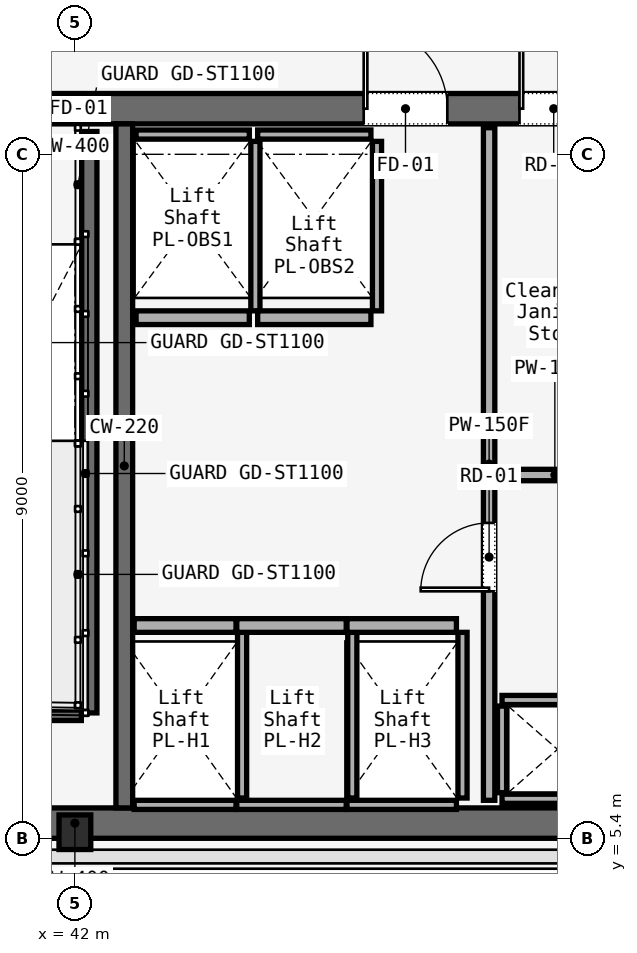
"""IFC4 building model, lengths in metres.
Left out: names, types, materials, properties, quantities, classifications, styles, units other than length and angle.
Written with IfcOpenShell. Run it as: python <this file> out.ifc"""

import sys

from ifc_helpers import new_model, si_unit, direction, frame, frame_2d, origin, origin_2d, place, context, subcontext, project, spatial, rectangle, i_section, extrude, element, fill, save


model = new_model("IFC4")
c1 = context("Model", 3, precision=1e-05, world=origin(), true_north=direction((0.0, 1.0)))
c2 = subcontext(c1, "Body", "Model", "MODEL_VIEW")
j1 = project(units=[si_unit("LENGTHUNIT", "METRE"), si_unit("PLANEANGLEUNIT", "RADIAN")], contexts=[c1])
p1 = place(None, origin())
s1 = spatial("IfcSite", under=j1, at=p1, CompositionType="ELEMENT")
p2 = place(p1, origin())
s2 = spatial("IfcBuilding", under=s1, at=p2, CompositionType="ELEMENT")
p3 = place(p2, frame((0.0, 0.0, 191.6)))
s3 = spatial("IfcBuildingStorey", under=s2, at=p3, CompositionType="ELEMENT", Elevation=191.6)
p4 = place(p3, frame((26.45, 15.0, 0.0), z_axis=(0.0, 0.0, 1.0), x_axis=(1.0, 0.0, 0.0)))
e1 = element("IfcWall", 1, at=p4, inside=s3, PredefinedType="SOLIDWALL", context=c2, shape_type="SweptSolid", body=[
    extrude(rectangle(XDim=31.1, YDim=0.4, at=frame_2d((15.55, 0.0))), origin(), (0.0, 0.0, 1.0), 3.58),
])
p5 = place(p4, frame((1.65, 0.0, 0.0)))
e2 = element("IfcOpeningElement", 2, at=p5, cuts=e1, PredefinedType="OPENING", context=c2, shape_type="SweptSolid", body=[
    extrude(rectangle(XDim=1.1, YDim=2.2, at=frame_2d((0.55, 1.1))), frame((0.0, 0.2, 0.0), z_axis=(0.0, -1.0, 0.0), x_axis=(1.0, 0.0, 0.0)), (0.0, 0.0, 1.0), 0.4),
])
p6 = place(p4, frame((13.65, 0.0, 0.0)))
e3 = element("IfcOpeningElement", 3, at=p6, cuts=e1, PredefinedType="OPENING", context=c2, shape_type="SweptSolid", body=[
    extrude(rectangle(XDim=1.1, YDim=2.2, at=frame_2d((0.55, 1.1))), frame((0.0, 0.2, 0.0), z_axis=(0.0, -1.0, 0.0), x_axis=(1.0, 0.0, 0.0)), (0.0, 0.0, 1.0), 0.4),
])
p7 = place(p4, frame((25.55, 0.0, 0.0)))
e4 = element("IfcOpeningElement", 4, at=p7, cuts=e1, PredefinedType="OPENING", context=c2, shape_type="SweptSolid", body=[
    extrude(rectangle(XDim=1.1, YDim=2.2, at=frame_2d((0.55, 1.1))), frame((0.0, 0.2, 0.0), z_axis=(0.0, -1.0, 0.0), x_axis=(1.0, 0.0, 0.0)), (0.0, 0.0, 1.0), 0.4),
])
p8 = place(p4, frame((10.7, 0.0, 0.0)))
e5 = element("IfcOpeningElement", 5, at=p8, cuts=e1, PredefinedType="OPENING", context=c2, shape_type="SweptSolid", body=[
    extrude(rectangle(XDim=1.4, YDim=2.2, at=frame_2d((0.7, 1.1))), frame((0.0, 0.2, 0.0), z_axis=(0.0, -1.0, 0.0), x_axis=(1.0, 0.0, 0.0)), (0.0, 0.0, 1.0), 0.4),
])
p9 = place(p4, frame((19.35, 0.0, 0.0)))
e6 = element("IfcOpeningElement", 6, at=p9, cuts=e1, PredefinedType="OPENING", context=c2, shape_type="SweptSolid", body=[
    extrude(rectangle(XDim=1.1, YDim=2.2, at=frame_2d((0.55, 1.1))), frame((0.0, 0.2, 0.0), z_axis=(0.0, -1.0, 0.0), x_axis=(1.0, 0.0, 0.0)), (0.0, 0.0, 1.0), 0.4),
])
p10 = place(p4, frame((21.4, 0.0, 0.0)))
e7 = element("IfcOpeningElement", 7, at=p10, cuts=e1, PredefinedType="OPENING", context=c2, shape_type="SweptSolid", body=[
    extrude(rectangle(XDim=0.9, YDim=2.1, at=frame_2d((0.45, 1.05))), frame((0.0, 0.2, 0.0), z_axis=(0.0, -1.0, 0.0), x_axis=(1.0, 0.0, 0.0)), (0.0, 0.0, 1.0), 0.4),
])
p11 = place(p4, frame((23.35, 0.0, 0.0)))
e8 = element("IfcOpeningElement", 8, at=p11, cuts=e1, PredefinedType="OPENING", context=c2, shape_type="SweptSolid", body=[
    extrude(rectangle(XDim=1.3, YDim=2.3, at=frame_2d((0.65, 1.15))), frame((0.0, 0.2, 0.0), z_axis=(0.0, -1.0, 0.0), x_axis=(1.0, 0.0, 0.0)), (0.0, 0.0, 1.0), 0.4),
])
p12 = place(p3, frame((26.45, 5.6, 0.0), z_axis=(0.0, 0.0, 1.0), x_axis=(1.0, 0.0, 0.0)))
e9 = element("IfcWall", 9, at=p12, inside=s3, PredefinedType="SOLIDWALL", context=c2, shape_type="SweptSolid", body=[
    extrude(rectangle(XDim=31.1, YDim=0.4, at=frame_2d((15.55, 0.0))), origin(), (0.0, 0.0, 1.0), 3.58),
])
p13 = place(p3, frame((42.65, 5.8, 0.0), z_axis=(0.0, 0.0, 1.0), x_axis=(0.0, 1.0, 0.0)))
e10 = element("IfcWall", 10, at=p13, inside=s3, PredefinedType="SOLIDWALL", context=c2, shape_type="SweptSolid", body=[
    extrude(rectangle(XDim=9.0, YDim=0.22, at=frame_2d((4.5, 0.0))), origin(), (0.0, 0.0, 1.0), 3.58),
])
p14 = place(p3, frame((42.0, 5.48, 0.0), z_axis=(0.0, 0.0, 1.0), x_axis=(1.0, 0.0, 0.0)))
e11 = element("IfcColumn", 11, at=p14, inside=s3, PredefinedType="COLUMN", context=c2, shape_type="SweptSolid", body=[
    extrude(i_section(OverallWidth=0.418, OverallDepth=0.455, WebThickness=0.042, FlangeThickness=0.052, FilletRadius=0.015, at=origin_2d()), origin(), (0.0, 0.0, 1.0), 3.58),
])
p15 = place(p3, frame((42.19, 14.7, 0.0), z_axis=(0.0, 0.0, 1.0), x_axis=(0.0, -1.0, 0.0)))
e12 = element("IfcWall", 12, at=p15, inside=s3, PredefinedType="SOLIDWALL", context=c2, shape_type="SweptSolid", body=[
    extrude(rectangle(XDim=7.65, YDim=0.2, at=frame_2d((3.825, 0.0))), origin(), (0.0, 0.0, 1.0), 3.8),
])
p16 = place(p3, frame((38.97, 7.05, 0.0), z_axis=(0.0, 0.0, 1.0), x_axis=(1.0, 0.0, 0.0)))
e13 = element("IfcWall", 13, at=p16, inside=s3, PredefinedType="SOLIDWALL", context=c2, shape_type="SweptSolid", body=[
    extrude(rectangle(XDim=3.115, YDim=0.2, at=frame_2d((1.558, 0.0))), origin(), (0.0, 0.0, 1.0), 3.8),
])
for number, where, z_axis, x_axis in (
    (14, (47.62, 5.92, 0.0), (0.0, 0.0, 1.0), (1.0, 0.0, 0.0)),
    (15, (47.62, 7.22, 0.0), (0.0, 0.0, 1.0), (1.0, 0.0, 0.0)),
):
    element("IfcWall", number, at=place(p3, frame(where, z_axis=z_axis, x_axis=x_axis)), inside=s3, PredefinedType="SOLIDWALL", context=c2, shape_type="SweptSolid", body=[
        extrude(rectangle(XDim=1.46, YDim=0.12, at=frame_2d((0.73, 0.0))), origin(), (0.0, 0.0, 1.0), 3.01),
    ])
p17 = place(p3, frame((47.62, 6.0, 0.0), z_axis=(0.0, 0.0, 1.0), x_axis=(0.0, 1.0, 0.0)))
e16 = element("IfcWall", 16, at=p17, inside=s3, PredefinedType="SOLIDWALL", context=c2, shape_type="SweptSolid", body=[
    extrude(rectangle(XDim=1.14, YDim=0.12, at=frame_2d((0.57, 0.0))), origin(), (0.0, 0.0, 1.0), 3.01),
])
p18 = place(p3, frame((47.45, 5.9, 0.0), z_axis=(0.0, 0.0, 1.0), x_axis=(0.0, 1.0, 0.0)))
e17 = element("IfcWall", 17, at=p18, inside=s3, PredefinedType="PARTITIONING", context=c2, shape_type="SweptSolid", body=[
    extrude(rectangle(XDim=8.85, YDim=0.15, at=frame_2d((4.425, 0.0))), origin(), (0.0, 0.0, 1.0), 3.01),
])
p19 = place(p18, frame((2.75, 0.0, 0.0)))
e18 = element("IfcOpeningElement", 18, at=p19, cuts=e17, PredefinedType="OPENING", context=c2, shape_type="SweptSolid", body=[
    extrude(rectangle(XDim=0.9, YDim=2.1, at=frame_2d((0.45, 1.05))), frame((0.0, 0.075, 0.0), z_axis=(0.0, -1.0, 0.0), x_axis=(1.0, 0.0, 0.0)), (0.0, 0.0, 1.0), 0.15),
])
p20 = place(p3, frame((47.45, 10.18, 0.0), z_axis=(0.0, 0.0, 1.0), x_axis=(1.0, 0.0, 0.0)))
e19 = element("IfcWall", 19, at=p20, inside=s3, PredefinedType="PARTITIONING", context=c2, shape_type="SweptSolid", body=[
    extrude(rectangle(XDim=1.73, YDim=0.15, at=frame_2d((0.865, 0.0))), origin(), (0.0, 0.0, 1.0), 3.01),
])
p21 = place(p3, frame((42.78, 8.2, 0.0), z_axis=(0.0, 0.0, 1.0), x_axis=(1.0, 0.0, 0.0)))
e20 = element("IfcWall", 20, at=p21, inside=s3, PredefinedType="SOLIDWALL", context=c2, shape_type="SweptSolid", body=[
    extrude(rectangle(XDim=1.34, YDim=0.18, at=frame_2d((0.67, 0.0))), origin(), (0.0, 0.0, 1.0), 3.01),
])
p22 = place(p3, frame((42.78, 5.84, 0.0), z_axis=(0.0, 0.0, 1.0), x_axis=(1.0, 0.0, 0.0)))
e21 = element("IfcWall", 21, at=p22, inside=s3, PredefinedType="SOLIDWALL", context=c2, shape_type="SweptSolid", body=[
    extrude(rectangle(XDim=1.34, YDim=0.12, at=frame_2d((0.67, 0.0))), origin(), (0.0, 0.0, 1.0), 3.01),
])
p23 = place(p3, frame((44.2, 5.93, 0.0), z_axis=(0.0, 0.0, 1.0), x_axis=(0.0, 1.0, 0.0)))
e22 = element("IfcWall", 22, at=p23, inside=s3, PredefinedType="SOLIDWALL", context=c2, shape_type="SweptSolid", body=[
    extrude(rectangle(XDim=2.18, YDim=0.12, at=frame_2d((1.09, 0.0))), origin(), (0.0, 0.0, 1.0), 3.01),
])
p24 = place(p3, frame((44.13, 8.2, 0.0), z_axis=(0.0, 0.0, 1.0), x_axis=(1.0, 0.0, 0.0)))
e23 = element("IfcWall", 23, at=p24, inside=s3, PredefinedType="SOLIDWALL", context=c2, shape_type="SweptSolid", body=[
    extrude(rectangle(XDim=1.44, YDim=0.18, at=frame_2d((0.72, 0.0))), origin(), (0.0, 0.0, 1.0), 3.01),
])
p25 = place(p3, frame((44.13, 5.84, 0.0), z_axis=(0.0, 0.0, 1.0), x_axis=(1.0, 0.0, 0.0)))
e24 = element("IfcWall", 24, at=p25, inside=s3, PredefinedType="SOLIDWALL", context=c2, shape_type="SweptSolid", body=[
    extrude(rectangle(XDim=1.44, YDim=0.12, at=frame_2d((0.72, 0.0))), origin(), (0.0, 0.0, 1.0), 3.01),
])
p26 = place(p3, frame((45.65, 5.93, 0.0), z_axis=(0.0, 0.0, 1.0), x_axis=(0.0, 1.0, 0.0)))
e25 = element("IfcWall", 25, at=p26, inside=s3, PredefinedType="SOLIDWALL", context=c2, shape_type="SweptSolid", body=[
    extrude(rectangle(XDim=2.18, YDim=0.12, at=frame_2d((1.09, 0.0))), origin(), (0.0, 0.0, 1.0), 3.01),
])
p27 = place(p3, frame((45.58, 8.2, 0.0), z_axis=(0.0, 0.0, 1.0), x_axis=(1.0, 0.0, 0.0)))
e26 = element("IfcWall", 26, at=p27, inside=s3, PredefinedType="SOLIDWALL", context=c2, shape_type="SweptSolid", body=[
    extrude(rectangle(XDim=1.44, YDim=0.18, at=frame_2d((0.72, 0.0))), origin(), (0.0, 0.0, 1.0), 3.01),
])
p28 = place(p3, frame((45.58, 5.84, 0.0), z_axis=(0.0, 0.0, 1.0), x_axis=(1.0, 0.0, 0.0)))
e27 = element("IfcWall", 27, at=p28, inside=s3, PredefinedType="SOLIDWALL", context=c2, shape_type="SweptSolid", body=[
    extrude(rectangle(XDim=1.44, YDim=0.12, at=frame_2d((0.72, 0.0))), origin(), (0.0, 0.0, 1.0), 3.01),
])
p29 = place(p3, frame((47.1, 5.93, 0.0), z_axis=(0.0, 0.0, 1.0), x_axis=(0.0, 1.0, 0.0)))
e28 = element("IfcWall", 28, at=p29, inside=s3, PredefinedType="SOLIDWALL", context=c2, shape_type="SweptSolid", body=[
    extrude(rectangle(XDim=2.18, YDim=0.12, at=frame_2d((1.09, 0.0))), origin(), (0.0, 0.0, 1.0), 3.01),
])
p30 = place(p3, frame((42.805, 12.25, 0.0), z_axis=(0.0, 0.0, 1.0), x_axis=(1.0, 0.0, 0.0)))
e29 = element("IfcWall", 29, at=p30, inside=s3, PredefinedType="SOLIDWALL", context=c2, shape_type="SweptSolid", body=[
    extrude(rectangle(XDim=1.49, YDim=0.18, at=frame_2d((0.745, 0.0))), origin(), (0.0, 0.0, 1.0), 3.01),
])
p31 = place(p3, frame((42.805, 14.66, 0.0), z_axis=(0.0, 0.0, 1.0), x_axis=(1.0, 0.0, 0.0)))
e30 = element("IfcWall", 30, at=p31, inside=s3, PredefinedType="SOLIDWALL", context=c2, shape_type="SweptSolid", body=[
    extrude(rectangle(XDim=1.49, YDim=0.12, at=frame_2d((0.745, 0.0))), origin(), (0.0, 0.0, 1.0), 3.01),
])
p32 = place(p3, frame((44.375, 12.34, 0.0), z_axis=(0.0, 0.0, 1.0), x_axis=(0.0, 1.0, 0.0)))
e31 = element("IfcWall", 31, at=p32, inside=s3, PredefinedType="SOLIDWALL", context=c2, shape_type="SweptSolid", body=[
    extrude(rectangle(XDim=2.23, YDim=0.12, at=frame_2d((1.115, 0.0))), origin(), (0.0, 0.0, 1.0), 3.01),
])
p33 = place(p3, frame((44.405, 12.25, 0.0), z_axis=(0.0, 0.0, 1.0), x_axis=(1.0, 0.0, 0.0)))
e32 = element("IfcWall", 32, at=p33, inside=s3, PredefinedType="SOLIDWALL", context=c2, shape_type="SweptSolid", body=[
    extrude(rectangle(XDim=1.49, YDim=0.18, at=frame_2d((0.745, 0.0))), origin(), (0.0, 0.0, 1.0), 3.01),
])
p34 = place(p3, frame((44.405, 14.66, 0.0), z_axis=(0.0, 0.0, 1.0), x_axis=(1.0, 0.0, 0.0)))
e33 = element("IfcWall", 33, at=p34, inside=s3, PredefinedType="SOLIDWALL", context=c2, shape_type="SweptSolid", body=[
    extrude(rectangle(XDim=1.49, YDim=0.12, at=frame_2d((0.745, 0.0))), origin(), (0.0, 0.0, 1.0), 3.01),
])
p35 = place(p3, frame((45.975, 12.34, 0.0), z_axis=(0.0, 0.0, 1.0), x_axis=(0.0, 1.0, 0.0)))
e34 = element("IfcWall", 34, at=p35, inside=s3, PredefinedType="SOLIDWALL", context=c2, shape_type="SweptSolid", body=[
    extrude(rectangle(XDim=2.23, YDim=0.12, at=frame_2d((1.115, 0.0))), origin(), (0.0, 0.0, 1.0), 3.01),
])
p36 = place(p9, origin())
e35 = element("IfcDoor", 35, at=p36, inside=s3, OperationType="SINGLE_SWING_LEFT", PredefinedType="DOOR", context=c2, shape_type="SweptSolid", body=[
    extrude(rectangle(XDim=1.1, YDim=2.2, at=frame_2d((0.55, 1.1))), frame((0.0, 0.025, 0.0), z_axis=(0.0, -1.0, 0.0), x_axis=(1.0, 0.0, 0.0)), (0.0, 0.0, 1.0), 0.05),
])
fill(e6, e35)
p37 = place(p10, origin())
e36 = element("IfcDoor", 36, at=p37, inside=s3, OperationType="SINGLE_SWING_LEFT", PredefinedType="DOOR", context=c2, shape_type="SweptSolid", body=[
    extrude(rectangle(XDim=0.9, YDim=2.1, at=frame_2d((0.45, 1.05))), frame((0.0, 0.025, 0.0), z_axis=(0.0, -1.0, 0.0), x_axis=(1.0, 0.0, 0.0)), (0.0, 0.0, 1.0), 0.05),
])
fill(e7, e36)
p38 = place(p19, origin())
e37 = element("IfcDoor", 37, at=p38, inside=s3, OperationType="SINGLE_SWING_RIGHT", PredefinedType="DOOR", context=c2, shape_type="SweptSolid", body=[
    extrude(rectangle(XDim=0.9, YDim=2.1, at=frame_2d((0.45, 1.05))), frame((0.0, 0.025, 0.0), z_axis=(0.0, -1.0, 0.0), x_axis=(1.0, 0.0, 0.0)), (0.0, 0.0, 1.0), 0.05),
])
fill(e18, e37)
save(model, sys.argv[1])
